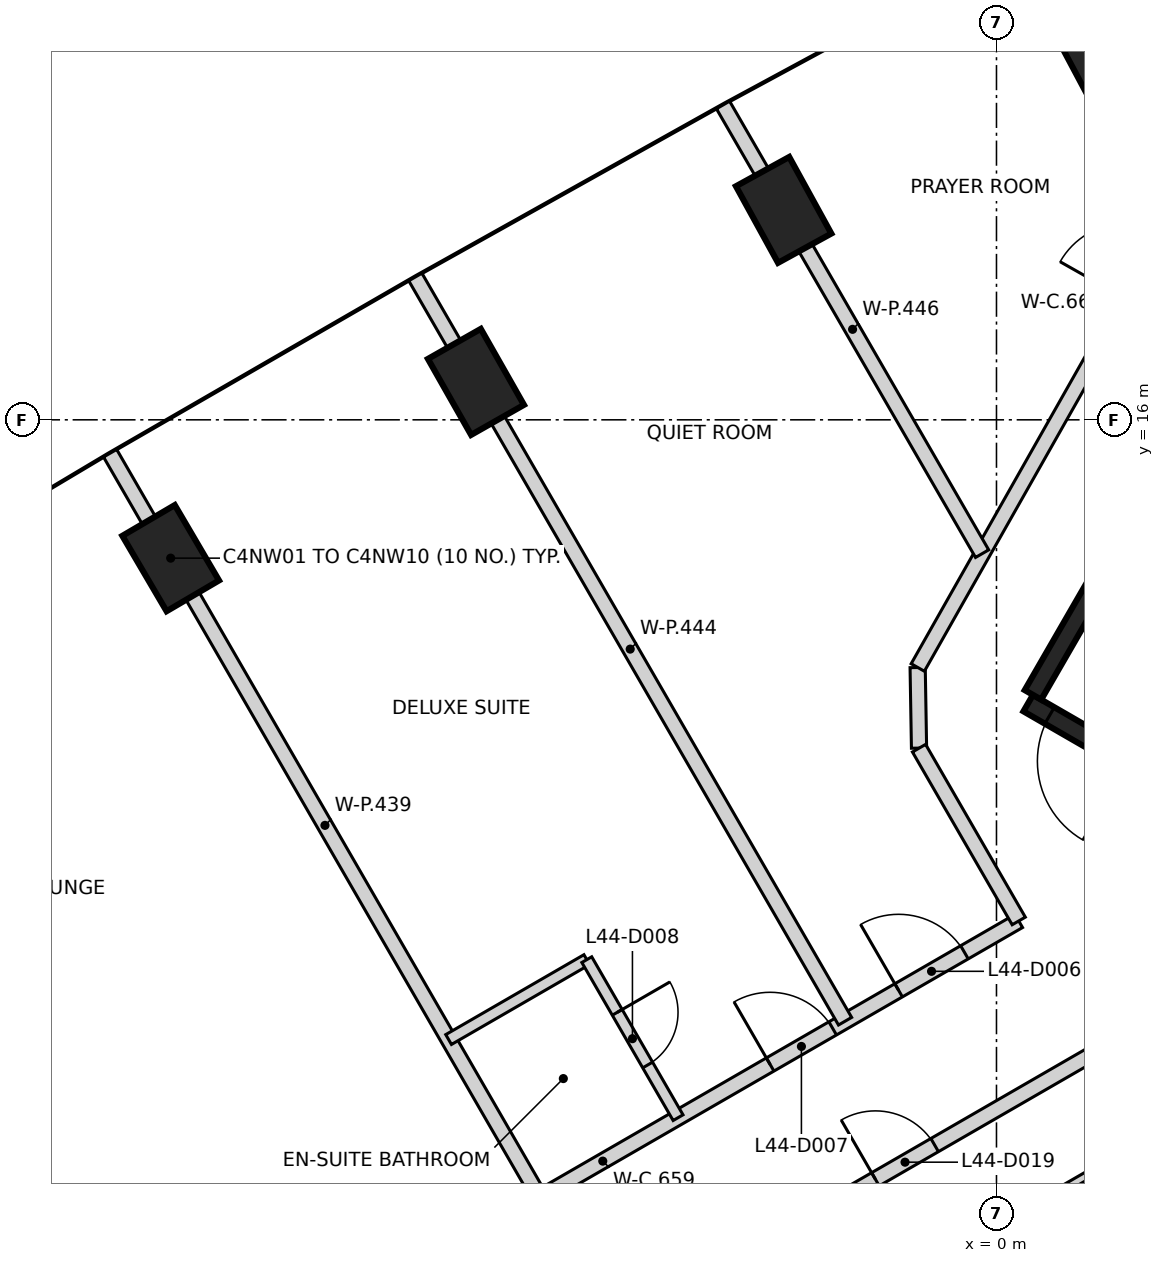
"""IFC4 building model, lengths in metres.
Left out: names, types, materials, properties, quantities, classifications, styles, units other than length and angle.
Written with IfcOpenShell. Run it as: python <this file> out.ifc"""

import sys

from ifc_helpers import new_model, si_unit, direction, frame, frame_2d, origin, origin_2d, place, context, subcontext, project, spatial, rectangle, extrude, element, fill, save


model = new_model("IFC4")
c1 = context("Model", 3, precision=1e-05, world=origin(), true_north=direction((0.0, 1.0)))
c2 = subcontext(c1, "Body", "Model", "MODEL_VIEW")
j1 = project(units=[si_unit("LENGTHUNIT", "METRE"), si_unit("PLANEANGLEUNIT", "RADIAN")], contexts=[c1])
p1 = place(None, origin())
s1 = spatial("IfcSite", under=j1, at=p1, CompositionType="ELEMENT")
p2 = place(p1, origin())
s2 = spatial("IfcBuilding", under=s1, at=p2, CompositionType="ELEMENT")
p3 = place(p2, frame((0.0, 0.0, 179.2)))
s3 = spatial("IfcBuildingStorey", under=s2, at=p3, CompositionType="ELEMENT", Elevation=179.2)
for number, where, z_axis, x_axis in (
    (1, (1.279, 20.968, -0.35), (0.0, 0.0, 1.0), (-0.47, 0.883, 0.0)),
    (2, (-2.8, 18.762, -0.35), (0.0, 0.0, 1.0), (-0.482, 0.876, 0.0)),
    (3, (-6.848, 16.499, -0.35), (0.0, 0.0, 1.0), (-0.494, 0.87, 0.0)),
    (4, (-10.864, 14.18, -0.35), (0.0, 0.0, 1.0), (-0.506, 0.862, 0.0)),
):
    element("IfcColumn", number, at=place(p3, frame(where, z_axis=z_axis, x_axis=x_axis)), inside=s3, PredefinedType="COLUMN", context=c2, shape_type="SweptSolid", body=[
        extrude(rectangle(XDim=1.15, YDim=0.8, at=origin_2d()), origin(), (0.0, 0.0, 1.0), 3.6),
    ])
p4 = place(p3, frame((10.42, 6.498, 0.0), z_axis=(0.0, 0.0, 1.0), x_axis=(-0.866021906294, 0.500006057782, 0.0)))
e5 = element("IfcWall", 5, at=p4, inside=s3, PredefinedType="SHEAR", context=c2, shape_type="SweptSolid", body=[
    extrude(rectangle(XDim=11.55, YDim=0.25, at=frame_2d((5.775, 0.0))), origin(), (0.0, 0.0, 1.0), 3.25),
])
p5 = place(p4, frame((10.025, 0.0, 0.0)))
e6 = element("IfcOpeningElement", 6, at=p5, cuts=e5, PredefinedType="OPENING", context=c2, shape_type="SweptSolid", body=[
    extrude(rectangle(XDim=1.2, YDim=2.1, at=frame_2d((0.6, 1.05))), frame((0.0, 0.135, 0.0), z_axis=(0.0, -1.0, 0.0), x_axis=(1.0, 0.0, 0.0)), (0.0, 0.0, 1.0), 0.27),
])
p6 = place(p4, frame((8.725, 0.0, 0.0)))
e7 = element("IfcOpeningElement", 7, at=p6, cuts=e5, PredefinedType="OPENING", context=c2, shape_type="SweptSolid", body=[
    extrude(rectangle(XDim=1.2, YDim=2.1, at=frame_2d((0.6, 1.05))), frame((0.0, 0.135, 0.0), z_axis=(0.0, -1.0, 0.0), x_axis=(1.0, 0.0, 0.0)), (0.0, 0.0, 1.0), 0.27),
])
p7 = place(p3, frame((0.48, 12.381, 0.0), z_axis=(0.0, 0.0, 1.0), x_axis=(0.49999885962, 0.866026062182, 0.0)))
e8 = element("IfcWall", 8, at=p7, inside=s3, PredefinedType="SHEAR", context=c2, shape_type="SweptSolid", body=[
    extrude(rectangle(XDim=5.225, YDim=0.25, at=frame_2d((2.612, 0.0))), origin(), (0.0, 0.0, 1.0), 3.25),
])
p8 = place(p3, frame((-10.652, 3.088, 0.0), z_axis=(0.0, 0.0, 1.0), x_axis=(0.866031821623, 0.499988883812, 0.0)))
e9 = element("IfcWall", 9, at=p8, inside=s3, PredefinedType="PARTITIONING", context=c2, shape_type="SweptSolid", body=[
    extrude(rectangle(XDim=12.638, YDim=0.2, at=frame_2d((6.319, 0.0))), origin(), (0.0, 0.0, 1.0), 3.25),
])
p9 = place(p8, frame((10.813, 0.0, 0.0)))
e10 = element("IfcOpeningElement", 10, at=p9, cuts=e9, PredefinedType="OPENING", context=c2, shape_type="SweptSolid", body=[
    extrude(rectangle(XDim=1.0, YDim=2.1, at=frame_2d((0.5, 1.05))), frame((0.0, 0.11, 0.0), z_axis=(0.0, -1.0, 0.0), x_axis=(1.0, 0.0, 0.0)), (0.0, 0.0, 1.0), 0.22),
])
p10 = place(p8, frame((8.862, 0.0, 0.0)))
e11 = element("IfcOpeningElement", 11, at=p10, cuts=e9, PredefinedType="OPENING", context=c2, shape_type="SweptSolid", body=[
    extrude(rectangle(XDim=0.95, YDim=2.1, at=frame_2d((0.475, 1.05))), frame((0.0, 0.11, 0.0), z_axis=(0.0, -1.0, 0.0), x_axis=(1.0, 0.0, 0.0)), (0.0, 0.0, 1.0), 0.22),
])
p11 = place(p8, frame((2.153, 0.0, 0.0)))
e12 = element("IfcOpeningElement", 12, at=p11, cuts=e9, PredefinedType="OPENING", context=c2, shape_type="SweptSolid", body=[
    extrude(rectangle(XDim=1.0, YDim=2.1, at=frame_2d((0.5, 1.05))), frame((0.0, 0.11, 0.0), z_axis=(0.0, -1.0, 0.0), x_axis=(1.0, 0.0, 0.0)), (0.0, 0.0, 1.0), 0.22),
])
p12 = place(p3, frame((-8.612, 1.956, 0.0), z_axis=(0.0, 0.0, 1.0), x_axis=(0.866034386606, 0.499984440973, 0.0)))
e13 = element("IfcWall", 13, at=p12, inside=s3, PredefinedType="PARTITIONING", context=c2, shape_type="SweptSolid", body=[
    extrude(rectangle(XDim=12.96, YDim=0.2, at=frame_2d((6.48, 0.0))), origin(), (0.0, 0.0, 1.0), 3.25),
])
p13 = place(p12, frame((8.105, 0.0, 0.0)))
e14 = element("IfcOpeningElement", 14, at=p13, cuts=e13, PredefinedType="OPENING", context=c2, shape_type="SweptSolid", body=[
    extrude(rectangle(XDim=0.9, YDim=2.1, at=frame_2d((0.45, 1.05))), frame((0.0, 0.11, 0.0), z_axis=(0.0, -1.0, 0.0), x_axis=(1.0, 0.0, 0.0)), (0.0, 0.0, 1.0), 0.22),
])
p14 = place(p12, frame((1.637, 0.0, 0.0)))
e15 = element("IfcOpeningElement", 15, at=p14, cuts=e13, PredefinedType="OPENING", context=c2, shape_type="SweptSolid", body=[
    extrude(rectangle(XDim=0.9, YDim=2.1, at=frame_2d((0.45, 1.05))), frame((0.0, 0.11, 0.0), z_axis=(0.0, -1.0, 0.0), x_axis=(1.0, 0.0, 0.0)), (0.0, 0.0, 1.0), 0.22),
])
p15 = place(p3, frame((-1.037, 12.741, 0.0), z_axis=(0.0, 0.0, 1.0), x_axis=(0.017040362824, -0.999854802476, 0.0)))
e16 = element("IfcWall", 16, at=p15, inside=s3, PredefinedType="PARTITIONING", context=c2, shape_type="SweptSolid", body=[
    extrude(rectangle(XDim=1.06, YDim=0.2, at=frame_2d((0.53, 0.0))), origin(), (0.0, 0.0, 1.0), 3.25),
])
p16 = place(p3, frame((-1.035, 12.742, 0.0), z_axis=(0.0, 0.0, 1.0), x_axis=(0.49267817774, 0.870211591039, 0.0)))
e17 = element("IfcWall", 17, at=p16, inside=s3, PredefinedType="PARTITIONING", context=c2, shape_type="SweptSolid", body=[
    extrude(rectangle(XDim=10.427, YDim=0.2, at=frame_2d((5.214, 0.0))), origin(), (0.0, 0.0, 1.0), 3.25),
])
p17 = place(p16, frame((5.568, 0.0, 0.0)))
e18 = element("IfcOpeningElement", 18, at=p17, cuts=e17, PredefinedType="OPENING", context=c2, shape_type="SweptSolid", body=[
    extrude(rectangle(XDim=1.0, YDim=2.1, at=frame_2d((0.5, 1.05))), frame((0.0, 0.11, 0.0), z_axis=(0.0, -1.0, 0.0), x_axis=(1.0, 0.0, 0.0)), (0.0, 0.0, 1.0), 0.22),
])
p18 = place(p3, frame((-1.019, 11.68, 0.0), z_axis=(0.0, 0.0, 1.0), x_axis=(0.499921088291, -0.866070958688, 0.0)))
e19 = element("IfcWall", 19, at=p18, inside=s3, PredefinedType="PARTITIONING", context=c2, shape_type="SweptSolid", body=[
    extrude(rectangle(XDim=2.625, YDim=0.2, at=frame_2d((1.312, 0.0))), origin(), (0.0, 0.0, 1.0), 3.25),
])
p19 = place(p3, frame((-11.661, 15.561, 0.0), z_axis=(0.0, 0.0, 1.0), x_axis=(0.499987250653, -0.866032764498, 0.0)))
e20 = element("IfcWall", 20, at=p19, inside=s3, PredefinedType="PARTITIONING", context=c2, shape_type="SweptSolid", body=[
    extrude(rectangle(XDim=11.306, YDim=0.2, at=frame_2d((5.653, 0.0))), origin(), (0.0, 0.0, 1.0), 3.25),
])
p20 = place(p3, frame((-7.6, 0.924, 0.0), z_axis=(0.0, 0.0, 1.0), x_axis=(0.866028806638, 0.499994106039, 0.0)))
e21 = element("IfcWall", 21, at=p20, inside=s3, PredefinedType="PARTITIONING", context=c2, shape_type="SweptSolid", body=[
    extrude(rectangle(XDim=12.24, YDim=0.2, at=frame_2d((6.12, 0.0))), origin(), (0.0, 0.0, 1.0), 3.25),
])
p21 = place(p3, frame((-7.646, 17.879, 0.0), z_axis=(0.0, 0.0, 1.0), x_axis=(0.500047691386, -0.865997867399, 0.0)))
e22 = element("IfcWall", 22, at=p21, inside=s3, PredefinedType="PARTITIONING", context=c2, shape_type="SweptSolid", body=[
    extrude(rectangle(XDim=11.306, YDim=0.2, at=frame_2d((5.653, 0.0))), origin(), (0.0, 0.0, 1.0), 3.25),
])
p22 = place(p3, frame((-3.598, 20.142, 0.0), z_axis=(0.0, 0.0, 1.0), x_axis=(0.500075890333, -0.865981584047, 0.0)))
e23 = element("IfcWall", 23, at=p22, inside=s3, PredefinedType="PARTITIONING", context=c2, shape_type="SweptSolid", body=[
    extrude(rectangle(XDim=6.816, YDim=0.2, at=frame_2d((3.408, 0.0))), origin(), (0.0, 0.0, 1.0), 3.25),
])
p23 = place(p3, frame((-7.208, 7.847, 0.0), z_axis=(0.0, 0.0, 1.0), x_axis=(0.865749785376, 0.500477081515, 0.0)))
e24 = element("IfcWall", 24, at=p23, inside=s3, PredefinedType="PARTITIONING", context=c2, shape_type="SweptSolid", body=[
    extrude(rectangle(XDim=2.1, YDim=0.15, at=frame_2d((1.05, 0.0))), origin(), (0.0, 0.0, 1.0), 3.25),
])
p24 = place(p3, frame((-5.39, 8.898, 0.0), z_axis=(0.0, 0.0, 1.0), x_axis=(0.500218298882, -0.865899332177, 0.0)))
e25 = element("IfcWall", 25, at=p24, inside=s3, PredefinedType="PARTITIONING", context=c2, shape_type="SweptSolid", body=[
    extrude(rectangle(XDim=2.401, YDim=0.15, at=frame_2d((1.2, 0.0))), origin(), (0.0, 0.0, 1.0), 3.25),
])
p25 = place(p24, frame((0.801, 0.0, 0.0)))
e26 = element("IfcOpeningElement", 26, at=p25, cuts=e25, PredefinedType="OPENING", context=c2, shape_type="SweptSolid", body=[
    extrude(rectangle(XDim=0.8, YDim=2.1, at=frame_2d((0.4, 1.05))), frame((0.0, 0.085, 0.0), z_axis=(0.0, -1.0, 0.0), x_axis=(1.0, 0.0, 0.0)), (0.0, 0.0, 1.0), 0.17),
])
p26 = place(p5, origin())
e27 = element("IfcDoor", 27, at=p26, inside=s3, OperationType="SINGLE_SWING_LEFT", PredefinedType="DOOR", context=c2, shape_type="SweptSolid", body=[
    extrude(rectangle(XDim=1.2, YDim=2.1, at=frame_2d((0.6, 1.05))), frame((0.0, 0.025, 0.0), z_axis=(0.0, -1.0, 0.0), x_axis=(1.0, 0.0, 0.0)), (0.0, 0.0, 1.0), 0.05),
])
fill(e6, e27)
p27 = place(p9, origin())
e28 = element("IfcDoor", 28, at=p27, inside=s3, OperationType="SINGLE_SWING_LEFT", PredefinedType="DOOR", context=c2, shape_type="SweptSolid", body=[
    extrude(rectangle(XDim=1.0, YDim=2.1, at=frame_2d((0.5, 1.05))), frame((0.0, 0.025, 0.0), z_axis=(0.0, -1.0, 0.0), x_axis=(1.0, 0.0, 0.0)), (0.0, 0.0, 1.0), 0.05),
])
fill(e10, e28)
p28 = place(p10, origin())
e29 = element("IfcDoor", 29, at=p28, inside=s3, OperationType="SINGLE_SWING_LEFT", PredefinedType="DOOR", context=c2, shape_type="SweptSolid", body=[
    extrude(rectangle(XDim=0.95, YDim=2.1, at=frame_2d((0.475, 1.05))), frame((0.0, 0.025, 0.0), z_axis=(0.0, -1.0, 0.0), x_axis=(1.0, 0.0, 0.0)), (0.0, 0.0, 1.0), 0.05),
])
fill(e11, e29)
p29 = place(p25, origin())
e30 = element("IfcDoor", 30, at=p29, inside=s3, OperationType="SINGLE_SWING_LEFT", PredefinedType="DOOR", context=c2, shape_type="SweptSolid", body=[
    extrude(rectangle(XDim=0.8, YDim=2.1, at=frame_2d((0.4, 1.05))), frame((0.0, 0.025, 0.0), z_axis=(0.0, -1.0, 0.0), x_axis=(1.0, 0.0, 0.0)), (0.0, 0.0, 1.0), 0.05),
])
fill(e26, e30)
p30 = place(p13, frame((0.9, 0.0, 0.0), z_axis=(0.0, 0.0, 1.0), x_axis=(-1.0, 0.0, 0.0)))
e31 = element("IfcDoor", 31, at=p30, inside=s3, OperationType="SINGLE_SWING_LEFT", PredefinedType="DOOR", context=c2, shape_type="SweptSolid", body=[
    extrude(rectangle(XDim=0.9, YDim=2.1, at=frame_2d((0.45, 1.05))), frame((0.0, 0.025, 0.0), z_axis=(0.0, -1.0, 0.0), x_axis=(1.0, 0.0, 0.0)), (0.0, 0.0, 1.0), 0.05),
])
fill(e14, e31)
save(model, sys.argv[1])
